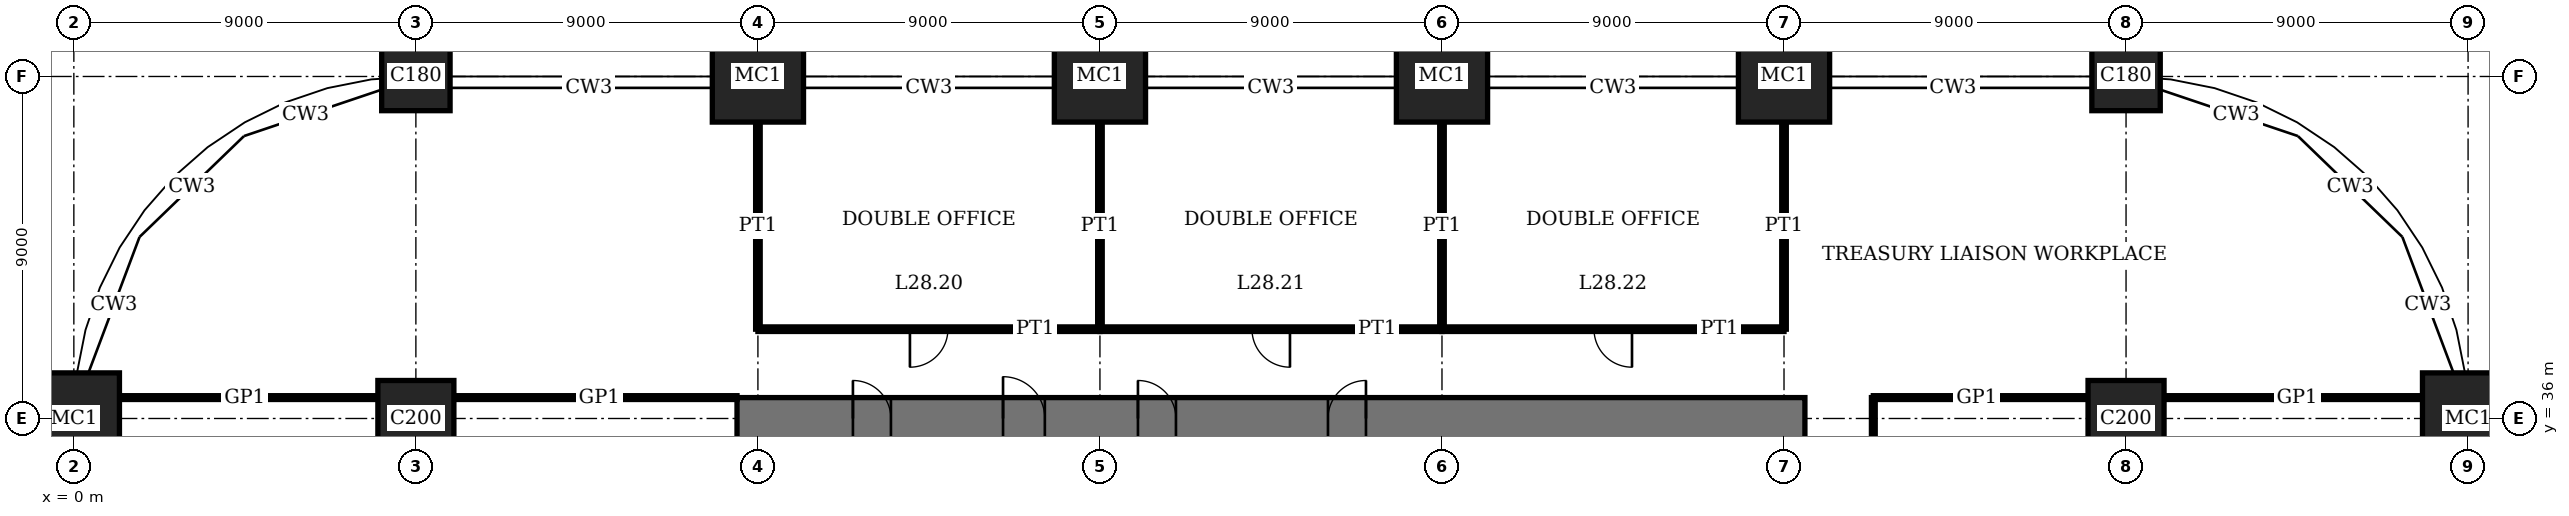
"""IFC4 building model, lengths in metres.
Left out: names, types, materials, properties, quantities, classifications, styles, units other than length and angle.
Written with IfcOpenShell. Run it as: python <this file> out.ifc"""

import sys

from ifc_helpers import new_model, si_unit, direction, frame, frame_2d, origin, origin_2d, place, context, subcontext, project, spatial, rectangle, extrude, element, fill, save


model = new_model("IFC4")
c1 = context("Model", 3, precision=1e-05, world=origin(), true_north=direction((0.0, 1.0)))
c2 = subcontext(c1, "Body", "Model", "MODEL_VIEW")
j1 = project(units=[si_unit("LENGTHUNIT", "METRE"), si_unit("PLANEANGLEUNIT", "RADIAN")], contexts=[c1])
p1 = place(None, origin())
s1 = spatial("IfcSite", under=j1, at=p1, CompositionType="ELEMENT")
p2 = place(p1, origin())
s2 = spatial("IfcBuilding", under=s1, at=p2, CompositionType="ELEMENT")
p3 = place(p2, frame((0.0, 0.0, 117.0)))
s3 = spatial("IfcBuildingStorey", under=s2, at=p3, CompositionType="ELEMENT", Elevation=117.0)
p4 = place(p3, frame((0.0, 36.0, 0.0), z_axis=(0.0, 0.0, 1.0), x_axis=(1.0, 0.0, 0.0)))
e1 = element("IfcColumn", 1, at=p4, inside=s3, PredefinedType="COLUMN", context=c2, shape_type="SweptSolid", body=[
    extrude(rectangle(XDim=2.4, YDim=2.4, at=origin_2d()), origin(), (0.0, 0.0, 1.0), 4.0),
])
p5 = place(p3, frame((9.0, 36.0, 0.0), z_axis=(0.0, 0.0, 1.0), x_axis=(1.0, 0.0, 0.0)))
e2 = element("IfcColumn", 2, at=p5, inside=s3, PredefinedType="COLUMN", context=c2, shape_type="SweptSolid", body=[
    extrude(rectangle(XDim=2.0, YDim=2.0, at=origin_2d()), origin(), (0.0, 0.0, 1.0), 4.0),
])
p6 = place(p3, frame((9.0, 45.0, 0.0), z_axis=(0.0, 0.0, 1.0), x_axis=(1.0, 0.0, 0.0)))
e3 = element("IfcColumn", 3, at=p6, inside=s3, PredefinedType="COLUMN", context=c2, shape_type="SweptSolid", body=[
    extrude(rectangle(XDim=1.8, YDim=1.8, at=origin_2d()), origin(), (0.0, 0.0, 1.0), 4.0),
])
for number, where, z_axis, x_axis in (
    (4, (18.0, 45.0, 0.0), (0.0, 0.0, 1.0), (1.0, 0.0, 0.0)),
    (5, (27.0, 45.0, 0.0), (0.0, 0.0, 1.0), (1.0, 0.0, 0.0)),
    (6, (36.0, 45.0, 0.0), (0.0, 0.0, 1.0), (1.0, 0.0, 0.0)),
    (7, (45.0, 45.0, 0.0), (0.0, 0.0, 1.0), (1.0, 0.0, 0.0)),
):
    element("IfcColumn", number, at=place(p3, frame(where, z_axis=z_axis, x_axis=x_axis)), inside=s3, PredefinedType="COLUMN", context=c2, shape_type="SweptSolid", body=[
        extrude(rectangle(XDim=2.4, YDim=2.4, at=origin_2d()), origin(), (0.0, 0.0, 1.0), 4.0),
    ])
p7 = place(p3, frame((54.0, 36.0, 0.0), z_axis=(0.0, 0.0, 1.0), x_axis=(1.0, 0.0, 0.0)))
e8 = element("IfcColumn", 8, at=p7, inside=s3, PredefinedType="COLUMN", context=c2, shape_type="SweptSolid", body=[
    extrude(rectangle(XDim=2.0, YDim=2.0, at=origin_2d()), origin(), (0.0, 0.0, 1.0), 4.0),
])
p8 = place(p3, frame((54.0, 45.0, 0.0), z_axis=(0.0, 0.0, 1.0), x_axis=(1.0, 0.0, 0.0)))
e9 = element("IfcColumn", 9, at=p8, inside=s3, PredefinedType="COLUMN", context=c2, shape_type="SweptSolid", body=[
    extrude(rectangle(XDim=1.8, YDim=1.8, at=origin_2d()), origin(), (0.0, 0.0, 1.0), 4.0),
])
p9 = place(p3, frame((63.0, 36.0, 0.0), z_axis=(0.0, 0.0, 1.0), x_axis=(1.0, 0.0, 0.0)))
e10 = element("IfcColumn", 10, at=p9, inside=s3, PredefinedType="COLUMN", context=c2, shape_type="SweptSolid", body=[
    extrude(rectangle(XDim=2.4, YDim=2.4, at=origin_2d()), origin(), (0.0, 0.0, 1.0), 4.0),
])
p10 = place(p3, frame((45.55, 36.0, 0.0), z_axis=(0.0, 0.0, 1.0), x_axis=(-1.0, 0.0, 0.0)))
e11 = element("IfcWall", 11, at=p10, inside=s3, PredefinedType="SHEAR", context=c2, shape_type="SweptSolid", body=[
    extrude(rectangle(XDim=28.1, YDim=1.1, at=frame_2d((14.05, 0.0))), origin(), (0.0, 0.0, 1.0), 4.0),
])
p11 = place(p10, frame((11.55, 0.0, 0.0)))
e12 = element("IfcOpeningElement", 12, at=p11, cuts=e11, PredefinedType="OPENING", context=c2, shape_type="SweptSolid", body=[
    extrude(rectangle(XDim=1.0, YDim=2.4, at=frame_2d((0.5, 1.2))), frame((0.0, 0.56, 0.0), z_axis=(0.0, -1.0, 0.0), x_axis=(1.0, 0.0, 0.0)), (0.0, 0.0, 1.0), 1.12),
])
p12 = place(p10, frame((16.55, 0.0, 0.0)))
e13 = element("IfcOpeningElement", 13, at=p12, cuts=e11, PredefinedType="OPENING", context=c2, shape_type="SweptSolid", body=[
    extrude(rectangle(XDim=1.0, YDim=2.4, at=frame_2d((0.5, 1.2))), frame((0.0, 0.56, 0.0), z_axis=(0.0, -1.0, 0.0), x_axis=(1.0, 0.0, 0.0)), (0.0, 0.0, 1.0), 1.12),
])
p13 = place(p10, frame((20.0, 0.0, 0.0)))
e14 = element("IfcOpeningElement", 14, at=p13, cuts=e11, PredefinedType="OPENING", context=c2, shape_type="SweptSolid", body=[
    extrude(rectangle(XDim=1.1, YDim=2.4, at=frame_2d((0.55, 1.2))), frame((0.0, 0.56, 0.0), z_axis=(0.0, -1.0, 0.0), x_axis=(1.0, 0.0, 0.0)), (0.0, 0.0, 1.0), 1.12),
])
p14 = place(p10, frame((24.05, 0.0, 0.0)))
e15 = element("IfcOpeningElement", 15, at=p14, cuts=e11, PredefinedType="OPENING", context=c2, shape_type="SweptSolid", body=[
    extrude(rectangle(XDim=1.0, YDim=2.4, at=frame_2d((0.5, 1.2))), frame((0.0, 0.56, 0.0), z_axis=(0.0, -1.0, 0.0), x_axis=(1.0, 0.0, 0.0)), (0.0, 0.0, 1.0), 1.12),
])
p15 = place(p3, frame((1.2, 36.55, 0.0), z_axis=(0.0, 0.0, 1.0), x_axis=(1.0, 0.0, 0.0)))
e16 = element("IfcWall", 16, at=p15, inside=s3, PredefinedType="PARTITIONING", context=c2, shape_type="SweptSolid", body=[
    extrude(rectangle(XDim=6.8, YDim=0.1, at=frame_2d((3.4, 0.0))), origin(), (0.0, 0.0, 1.0), 3.75),
])
p16 = place(p3, frame((10.0, 36.55, 0.0), z_axis=(0.0, 0.0, 1.0), x_axis=(1.0, 0.0, 0.0)))
e17 = element("IfcWall", 17, at=p16, inside=s3, PredefinedType="PARTITIONING", context=c2, shape_type="SweptSolid", body=[
    extrude(rectangle(XDim=7.45, YDim=0.1, at=frame_2d((3.725, 0.0))), origin(), (0.0, 0.0, 1.0), 3.75),
])
p17 = place(p3, frame((47.35, 36.55, 0.0), z_axis=(0.0, 0.0, 1.0), x_axis=(1.0, 0.0, 0.0)))
e18 = element("IfcWall", 18, at=p17, inside=s3, PredefinedType="PARTITIONING", context=c2, shape_type="SweptSolid", body=[
    extrude(rectangle(XDim=5.65, YDim=0.1, at=frame_2d((2.825, 0.0))), origin(), (0.0, 0.0, 1.0), 3.75),
])
p18 = place(p3, frame((55.0, 36.55, 0.0), z_axis=(0.0, 0.0, 1.0), x_axis=(1.0, 0.0, 0.0)))
e19 = element("IfcWall", 19, at=p18, inside=s3, PredefinedType="PARTITIONING", context=c2, shape_type="SweptSolid", body=[
    extrude(rectangle(XDim=6.8, YDim=0.1, at=frame_2d((3.4, 0.0))), origin(), (0.0, 0.0, 1.0), 3.75),
])
p19 = place(p3, frame((18.0, 38.35, 0.0), z_axis=(0.0, 0.0, 1.0), x_axis=(1.0, 0.0, 0.0)))
e20 = element("IfcWall", 20, at=p19, inside=s3, PredefinedType="PARTITIONING", context=c2, shape_type="SweptSolid", body=[
    extrude(rectangle(XDim=9.0, YDim=0.12, at=frame_2d((4.5, 0.0))), origin(), (0.0, 0.0, 1.0), 3.75),
])
p20 = place(p19, frame((4.0, 0.0, 0.0)))
e21 = element("IfcOpeningElement", 21, at=p20, cuts=e20, PredefinedType="OPENING", context=c2, shape_type="SweptSolid", body=[
    extrude(rectangle(XDim=1.0, YDim=2.4, at=frame_2d((0.5, 1.2))), frame((0.0, 0.07, 0.0), z_axis=(0.0, -1.0, 0.0), x_axis=(1.0, 0.0, 0.0)), (0.0, 0.0, 1.0), 0.14),
])
p21 = place(p3, frame((27.0, 38.35, 0.0), z_axis=(0.0, 0.0, 1.0), x_axis=(1.0, 0.0, 0.0)))
e22 = element("IfcWall", 22, at=p21, inside=s3, PredefinedType="PARTITIONING", context=c2, shape_type="SweptSolid", body=[
    extrude(rectangle(XDim=9.0, YDim=0.12, at=frame_2d((4.5, 0.0))), origin(), (0.0, 0.0, 1.0), 3.75),
])
p22 = place(p21, frame((4.0, 0.0, 0.0)))
e23 = element("IfcOpeningElement", 23, at=p22, cuts=e22, PredefinedType="OPENING", context=c2, shape_type="SweptSolid", body=[
    extrude(rectangle(XDim=1.0, YDim=2.4, at=frame_2d((0.5, 1.2))), frame((0.0, 0.07, 0.0), z_axis=(0.0, -1.0, 0.0), x_axis=(1.0, 0.0, 0.0)), (0.0, 0.0, 1.0), 0.14),
])
p23 = place(p3, frame((36.0, 38.35, 0.0), z_axis=(0.0, 0.0, 1.0), x_axis=(1.0, 0.0, 0.0)))
e24 = element("IfcWall", 24, at=p23, inside=s3, PredefinedType="PARTITIONING", context=c2, shape_type="SweptSolid", body=[
    extrude(rectangle(XDim=9.0, YDim=0.12, at=frame_2d((4.5, 0.0))), origin(), (0.0, 0.0, 1.0), 3.75),
])
p24 = place(p23, frame((4.0, 0.0, 0.0)))
e25 = element("IfcOpeningElement", 25, at=p24, cuts=e24, PredefinedType="OPENING", context=c2, shape_type="SweptSolid", body=[
    extrude(rectangle(XDim=1.0, YDim=2.4, at=frame_2d((0.5, 1.2))), frame((0.0, 0.07, 0.0), z_axis=(0.0, -1.0, 0.0), x_axis=(1.0, 0.0, 0.0)), (0.0, 0.0, 1.0), 0.14),
])
for number, where, z_axis, x_axis in (
    (26, (18.0, 38.35, 0.0), (0.0, 0.0, 1.0), (0.0, 1.0, 0.0)),
    (27, (27.0, 38.35, 0.0), (0.0, 0.0, 1.0), (0.0, 1.0, 0.0)),
    (28, (36.0, 38.35, 0.0), (0.0, 0.0, 1.0), (0.0, 1.0, 0.0)),
    (29, (45.0, 38.35, 0.0), (0.0, 0.0, 1.0), (0.0, 1.0, 0.0)),
):
    element("IfcWall", number, at=place(p3, frame(where, z_axis=z_axis, x_axis=x_axis)), inside=s3, PredefinedType="PARTITIONING", context=c2, shape_type="SweptSolid", body=[
        extrude(rectangle(XDim=5.45, YDim=0.12, at=frame_2d((2.725, 0.0))), origin(), (0.0, 0.0, 1.0), 3.05),
    ])
p25 = place(p3, frame((47.35, 27.0, 0.0), z_axis=(0.0, 0.0, 1.0), x_axis=(0.0, 1.0, 0.0)))
e30 = element("IfcWall", 30, at=p25, inside=s3, PredefinedType="PARTITIONING", context=c2, shape_type="SweptSolid", body=[
    extrude(rectangle(XDim=9.55, YDim=0.1, at=frame_2d((4.775, 0.0))), origin(), (0.0, 0.0, 1.0), 3.75),
])
p26 = place(p25, frame((4.275, 0.0, 0.0)))
e31 = element("IfcOpeningElement", 31, at=p26, cuts=e30, PredefinedType="OPENING", context=c2, shape_type="SweptSolid", body=[
    extrude(rectangle(XDim=1.0, YDim=2.4, at=frame_2d((0.5, 1.2))), frame((0.0, 0.06, 0.0), z_axis=(0.0, -1.0, 0.0), x_axis=(1.0, 0.0, 0.0)), (0.0, 0.0, 1.0), 0.12),
])
p27 = place(p11, origin())
e32 = element("IfcDoor", 32, at=p27, inside=s3, OperationType="SINGLE_SWING_LEFT", PredefinedType="DOOR", context=c2, shape_type="SweptSolid", body=[
    extrude(rectangle(XDim=1.0, YDim=2.4, at=frame_2d((0.5, 1.2))), frame((0.0, 0.025, 0.0), z_axis=(0.0, -1.0, 0.0), x_axis=(1.0, 0.0, 0.0)), (0.0, 0.0, 1.0), 0.05),
    extrude(rectangle(XDim=0.04, YDim=2.4, at=frame_2d((0.02, 1.2))), frame((0.0, 0.4, 0.0), z_axis=(0.0, -1.0, 0.0), x_axis=(1.0, 0.0, 0.0)), (0.0, 0.0, 1.0), 0.8),
    extrude(rectangle(XDim=0.04, YDim=2.4, at=frame_2d((0.98, 1.2))), frame((0.0, 0.4, 0.0), z_axis=(0.0, -1.0, 0.0), x_axis=(1.0, 0.0, 0.0)), (0.0, 0.0, 1.0), 0.8),
    extrude(rectangle(XDim=1.0, YDim=0.04, at=frame_2d((0.5, 2.38))), frame((0.0, 0.4, 0.0), z_axis=(0.0, -1.0, 0.0), x_axis=(1.0, 0.0, 0.0)), (0.0, 0.0, 1.0), 0.8),
])
fill(e12, e32)
p28 = place(p12, origin())
e33 = element("IfcDoor", 33, at=p28, inside=s3, OperationType="SINGLE_SWING_RIGHT", PredefinedType="DOOR", context=c2, shape_type="SweptSolid", body=[
    extrude(rectangle(XDim=1.0, YDim=2.4, at=frame_2d((0.5, 1.2))), frame((0.0, 0.025, 0.0), z_axis=(0.0, -1.0, 0.0), x_axis=(1.0, 0.0, 0.0)), (0.0, 0.0, 1.0), 0.05),
    extrude(rectangle(XDim=0.04, YDim=2.4, at=frame_2d((0.02, 1.2))), frame((0.0, 0.4, 0.0), z_axis=(0.0, -1.0, 0.0), x_axis=(1.0, 0.0, 0.0)), (0.0, 0.0, 1.0), 0.8),
    extrude(rectangle(XDim=0.04, YDim=2.4, at=frame_2d((0.98, 1.2))), frame((0.0, 0.4, 0.0), z_axis=(0.0, -1.0, 0.0), x_axis=(1.0, 0.0, 0.0)), (0.0, 0.0, 1.0), 0.8),
    extrude(rectangle(XDim=1.0, YDim=0.04, at=frame_2d((0.5, 2.38))), frame((0.0, 0.4, 0.0), z_axis=(0.0, -1.0, 0.0), x_axis=(1.0, 0.0, 0.0)), (0.0, 0.0, 1.0), 0.8),
])
fill(e13, e33)
p29 = place(p13, origin())
e34 = element("IfcDoor", 34, at=p29, inside=s3, OperationType="SINGLE_SWING_RIGHT", PredefinedType="DOOR", context=c2, shape_type="SweptSolid", body=[
    extrude(rectangle(XDim=1.1, YDim=2.4, at=frame_2d((0.55, 1.2))), frame((0.0, 0.025, 0.0), z_axis=(0.0, -1.0, 0.0), x_axis=(1.0, 0.0, 0.0)), (0.0, 0.0, 1.0), 0.05),
    extrude(rectangle(XDim=0.04, YDim=2.4, at=frame_2d((0.02, 1.2))), frame((0.0, 0.44, 0.0), z_axis=(0.0, -1.0, 0.0), x_axis=(1.0, 0.0, 0.0)), (0.0, 0.0, 1.0), 0.88),
    extrude(rectangle(XDim=0.04, YDim=2.4, at=frame_2d((1.08, 1.2))), frame((0.0, 0.44, 0.0), z_axis=(0.0, -1.0, 0.0), x_axis=(1.0, 0.0, 0.0)), (0.0, 0.0, 1.0), 0.88),
    extrude(rectangle(XDim=1.1, YDim=0.04, at=frame_2d((0.55, 2.38))), frame((0.0, 0.44, 0.0), z_axis=(0.0, -1.0, 0.0), x_axis=(1.0, 0.0, 0.0)), (0.0, 0.0, 1.0), 0.88),
])
fill(e14, e34)
p30 = place(p14, origin())
e35 = element("IfcDoor", 35, at=p30, inside=s3, OperationType="SINGLE_SWING_RIGHT", PredefinedType="DOOR", context=c2, shape_type="SweptSolid", body=[
    extrude(rectangle(XDim=1.0, YDim=2.4, at=frame_2d((0.5, 1.2))), frame((0.0, 0.025, 0.0), z_axis=(0.0, -1.0, 0.0), x_axis=(1.0, 0.0, 0.0)), (0.0, 0.0, 1.0), 0.05),
    extrude(rectangle(XDim=0.04, YDim=2.4, at=frame_2d((0.02, 1.2))), frame((0.0, 0.4, 0.0), z_axis=(0.0, -1.0, 0.0), x_axis=(1.0, 0.0, 0.0)), (0.0, 0.0, 1.0), 0.8),
    extrude(rectangle(XDim=0.04, YDim=2.4, at=frame_2d((0.98, 1.2))), frame((0.0, 0.4, 0.0), z_axis=(0.0, -1.0, 0.0), x_axis=(1.0, 0.0, 0.0)), (0.0, 0.0, 1.0), 0.8),
    extrude(rectangle(XDim=1.0, YDim=0.04, at=frame_2d((0.5, 2.38))), frame((0.0, 0.4, 0.0), z_axis=(0.0, -1.0, 0.0), x_axis=(1.0, 0.0, 0.0)), (0.0, 0.0, 1.0), 0.8),
])
fill(e15, e35)
p31 = place(p20, origin())
e36 = element("IfcDoor", 36, at=p31, inside=s3, OperationType="SINGLE_SWING_LEFT", PredefinedType="DOOR", context=c2, shape_type="SweptSolid", body=[
    extrude(rectangle(XDim=1.0, YDim=2.4, at=frame_2d((0.5, 1.2))), frame((0.0, 0.025, 0.0), z_axis=(0.0, -1.0, 0.0), x_axis=(1.0, 0.0, 0.0)), (0.0, 0.0, 1.0), 0.05),
])
fill(e21, e36)
p32 = place(p22, origin())
e37 = element("IfcDoor", 37, at=p32, inside=s3, OperationType="SINGLE_SWING_RIGHT", PredefinedType="DOOR", context=c2, shape_type="SweptSolid", body=[
    extrude(rectangle(XDim=1.0, YDim=2.4, at=frame_2d((0.5, 1.2))), frame((0.0, 0.025, 0.0), z_axis=(0.0, -1.0, 0.0), x_axis=(1.0, 0.0, 0.0)), (0.0, 0.0, 1.0), 0.05),
])
fill(e23, e37)
p33 = place(p24, origin())
e38 = element("IfcDoor", 38, at=p33, inside=s3, OperationType="SINGLE_SWING_RIGHT", PredefinedType="DOOR", context=c2, shape_type="SweptSolid", body=[
    extrude(rectangle(XDim=1.0, YDim=2.4, at=frame_2d((0.5, 1.2))), frame((0.0, 0.025, 0.0), z_axis=(0.0, -1.0, 0.0), x_axis=(1.0, 0.0, 0.0)), (0.0, 0.0, 1.0), 0.05),
])
fill(e25, e38)
save(model, sys.argv[1])
